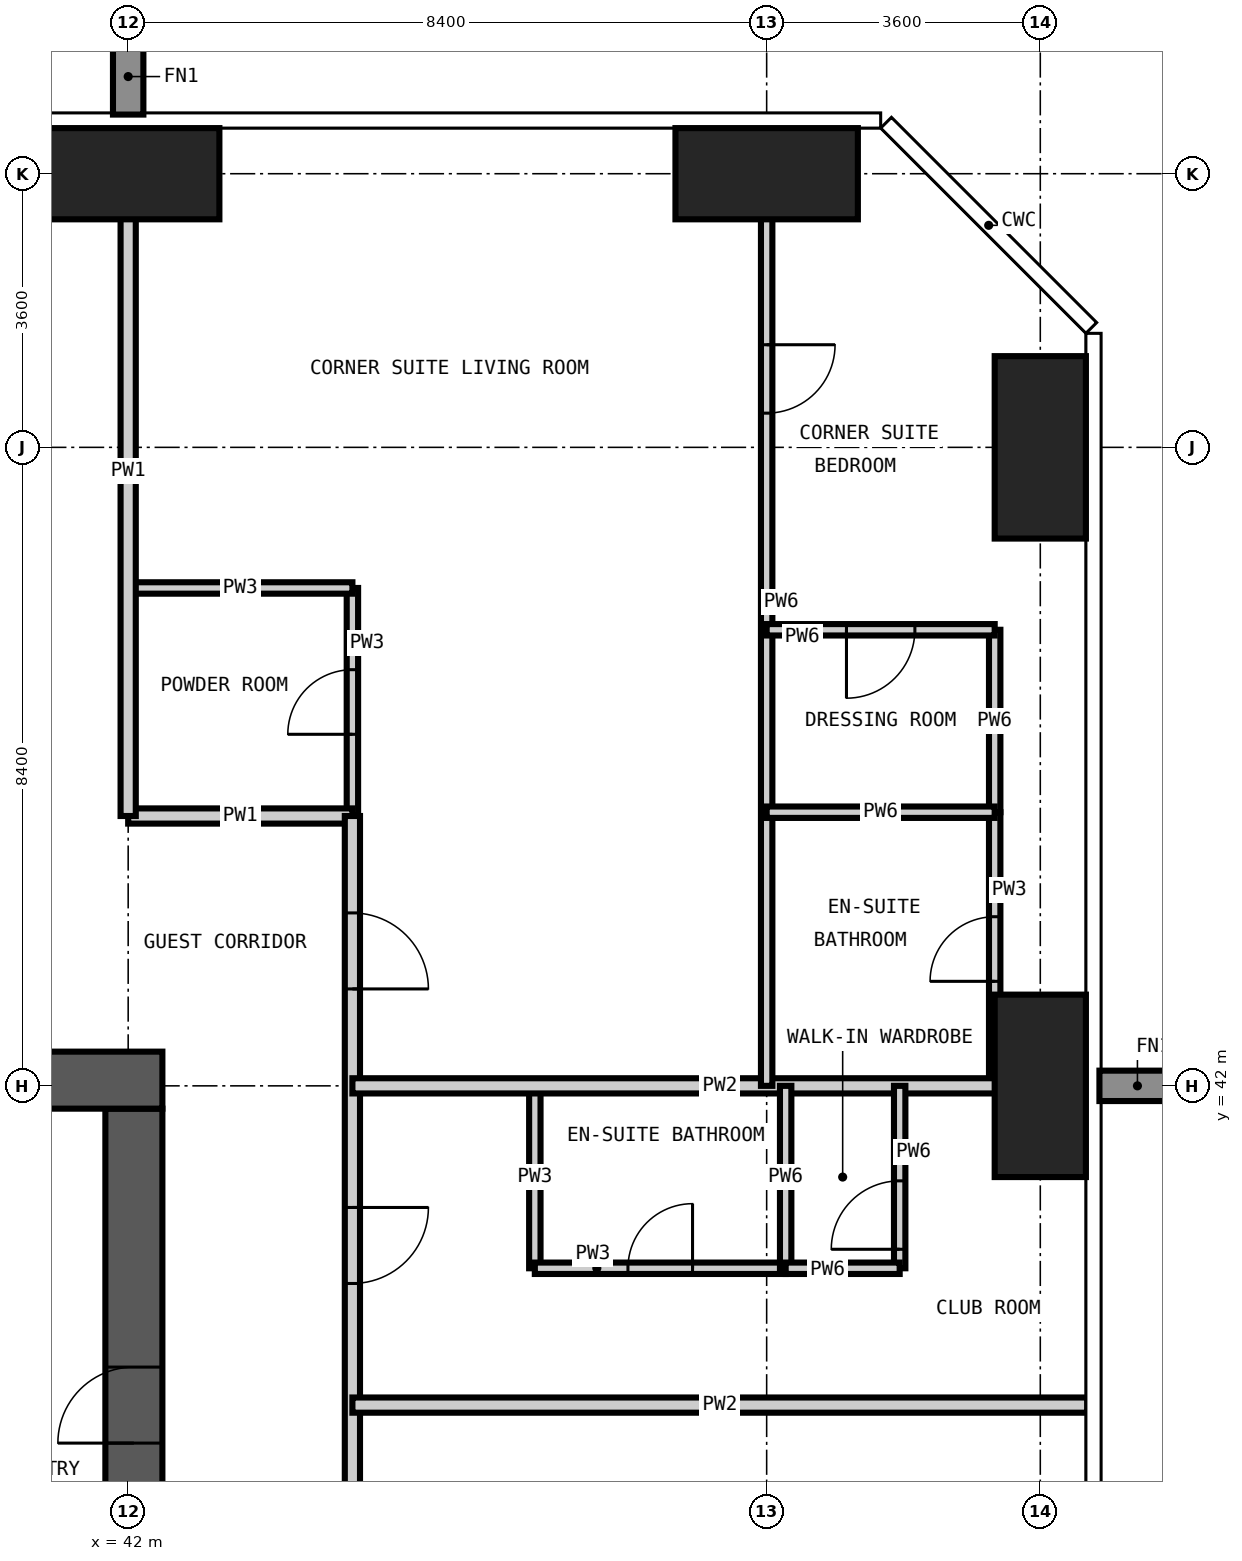
"""IFC4 building model, lengths in metres.
Left out: names, types, materials, properties, quantities, classifications, styles, units other than length and angle.
Written with IfcOpenShell. Run it as: python <this file> out.ifc"""

import sys

from ifc_helpers import new_model, si_unit, direction, frame, frame_2d, origin, origin_2d, place, context, subcontext, project, spatial, rectangle, extrude, element, fill, save


model = new_model("IFC4")
c1 = context("Model", 3, precision=1e-05, world=origin(), true_north=direction((0.0, 1.0)))
c2 = subcontext(c1, "Body", "Model", "MODEL_VIEW")
j1 = project(units=[si_unit("LENGTHUNIT", "METRE"), si_unit("PLANEANGLEUNIT", "RADIAN")], contexts=[c1])
p1 = place(None, origin())
s1 = spatial("IfcSite", under=j1, at=p1, CompositionType="ELEMENT")
p2 = place(p1, origin())
s2 = spatial("IfcBuilding", under=s1, at=p2, CompositionType="ELEMENT")
p3 = place(p2, frame((0.0, 0.0, 177.0)))
s3 = spatial("IfcBuildingStorey", under=s2, at=p3, CompositionType="ELEMENT", Elevation=177.0)
for number, where, z_axis, x_axis in (
    (1, (42.0, 54.0, -0.35), (0.0, 0.0, 1.0), (1.0, 0.0, 0.0)),
    (2, (50.4, 54.0, -0.35), (0.0, 0.0, 1.0), (1.0, 0.0, 0.0)),
):
    element("IfcColumn", number, at=place(p3, frame(where, z_axis=z_axis, x_axis=x_axis)), inside=s3, PredefinedType="COLUMN", context=c2, shape_type="SweptSolid", body=[
        extrude(rectangle(XDim=2.4, YDim=1.2, at=origin_2d()), origin(), (0.0, 0.0, 1.0), 3.6),
    ])
for number, where, z_axis, x_axis in (
    (3, (54.0, 42.0, -0.35), (0.0, 0.0, 1.0), (1.0, 0.0, 0.0)),
    (4, (54.0, 50.4, -0.35), (0.0, 0.0, 1.0), (1.0, 0.0, 0.0)),
):
    element("IfcColumn", number, at=place(p3, frame(where, z_axis=z_axis, x_axis=x_axis)), inside=s3, PredefinedType="COLUMN", context=c2, shape_type="SweptSolid", body=[
        extrude(rectangle(XDim=1.2, YDim=2.4, at=origin_2d()), origin(), (0.0, 0.0, 1.0), 3.6),
    ])
p4 = place(p3, frame((42.075, 17.1, -0.35), z_axis=(0.0, 0.0, 1.0), x_axis=(0.0, 1.0, 0.0)))
e5 = element("IfcWall", 5, at=p4, inside=s3, PredefinedType="SHEAR", context=c2, shape_type="SweptSolid", body=[
    extrude(rectangle(XDim=24.6, YDim=0.75, at=frame_2d((12.3, 0.0))), origin(), (0.0, 0.0, 1.0), 3.6),
])
p5 = place(p4, frame((0.5, 0.0, 0.35)))
e6 = element("IfcOpeningElement", 6, at=p5, cuts=e5, PredefinedType="OPENING", context=c2, shape_type="SweptSolid", body=[
    extrude(rectangle(XDim=1.2, YDim=2.2, at=frame_2d((0.6, 1.1))), frame((0.0, 0.385, 0.0), z_axis=(0.0, -1.0, 0.0), x_axis=(1.0, 0.0, 0.0)), (0.0, 0.0, 1.0), 0.77),
])
p6 = place(p4, frame((11.8, 0.0, 0.35)))
e7 = element("IfcOpeningElement", 7, at=p6, cuts=e5, PredefinedType="OPENING", context=c2, shape_type="SweptSolid", body=[
    extrude(rectangle(XDim=1.0, YDim=2.1, at=frame_2d((0.5, 1.05))), frame((0.0, 0.385, 0.0), z_axis=(0.0, -1.0, 0.0), x_axis=(1.0, 0.0, 0.0)), (0.0, 0.0, 1.0), 0.77),
])
p7 = place(p4, frame((20.2, 0.0, 0.35)))
e8 = element("IfcOpeningElement", 8, at=p7, cuts=e5, PredefinedType="OPENING", context=c2, shape_type="SweptSolid", body=[
    extrude(rectangle(XDim=1.0, YDim=2.1, at=frame_2d((0.5, 1.05))), frame((0.0, 0.385, 0.0), z_axis=(0.0, -1.0, 0.0), x_axis=(1.0, 0.0, 0.0)), (0.0, 0.0, 1.0), 0.77),
])
p8 = place(p3, frame((42.45, 42.075, -0.35), z_axis=(0.0, 0.0, 1.0), x_axis=(-1.0, 0.0, 0.0)))
e9 = element("IfcWall", 9, at=p8, inside=s3, PredefinedType="SHEAR", context=c2, shape_type="SweptSolid", body=[
    extrude(rectangle(XDim=26.1, YDim=0.75, at=frame_2d((13.05, 0.0))), origin(), (0.0, 0.0, 1.0), 3.6),
])
p9 = place(p8, frame((20.95, 0.0, 0.35)))
e10 = element("IfcOpeningElement", 10, at=p9, cuts=e9, PredefinedType="OPENING", context=c2, shape_type="SweptSolid", body=[
    extrude(rectangle(XDim=1.0, YDim=2.1, at=frame_2d((0.5, 1.05))), frame((0.0, 0.385, 0.0), z_axis=(0.0, -1.0, 0.0), x_axis=(1.0, 0.0, 0.0)), (0.0, 0.0, 1.0), 0.77),
])
p10 = place(p8, frame((10.35, 0.0, 0.35)))
e11 = element("IfcOpeningElement", 11, at=p10, cuts=e9, PredefinedType="OPENING", context=c2, shape_type="SweptSolid", body=[
    extrude(rectangle(XDim=1.2, YDim=2.2, at=frame_2d((0.6, 1.1))), frame((0.0, 0.385, 0.0), z_axis=(0.0, -1.0, 0.0), x_axis=(1.0, 0.0, 0.0)), (0.0, 0.0, 1.0), 0.77),
])
p11 = place(p3, frame((44.95, 45.55, 0.0), z_axis=(0.0, 0.0, 1.0), x_axis=(0.0, 1.0, 0.0)))
e12 = element("IfcWall", 12, at=p11, inside=s3, PredefinedType="PARTITIONING", context=c2, shape_type="SweptSolid", body=[
    extrude(rectangle(XDim=3.0, YDim=0.15, at=frame_2d((1.5, 0.0))), origin(), (0.0, 0.0, 1.0), 3.25),
])
p12 = place(p11, frame((1.075, 0.0, 0.0)))
e13 = element("IfcOpeningElement", 13, at=p12, cuts=e12, PredefinedType="OPENING", context=c2, shape_type="SweptSolid", body=[
    extrude(rectangle(XDim=0.85, YDim=2.1, at=frame_2d((0.425, 1.05))), frame((0.0, 0.085, 0.0), z_axis=(0.0, -1.0, 0.0), x_axis=(1.0, 0.0, 0.0)), (0.0, 0.0, 1.0), 0.17),
])
p13 = place(p3, frame((47.35, 39.6, 0.0), z_axis=(0.0, 0.0, 1.0), x_axis=(0.0, 1.0, 0.0)))
e14 = element("IfcWall", 14, at=p13, inside=s3, PredefinedType="PARTITIONING", context=c2, shape_type="SweptSolid", body=[
    extrude(rectangle(XDim=2.4, YDim=0.15, at=frame_2d((1.2, 0.0))), origin(), (0.0, 0.0, 1.0), 3.25),
])
p14 = place(p3, frame((53.4, 42.0, 0.0), z_axis=(0.0, 0.0, 1.0), x_axis=(0.0, 1.0, 0.0)))
e15 = element("IfcWall", 15, at=p14, inside=s3, PredefinedType="PARTITIONING", context=c2, shape_type="SweptSolid", body=[
    extrude(rectangle(XDim=3.6, YDim=0.15, at=frame_2d((1.8, 0.0))), origin(), (0.0, 0.0, 1.0), 3.25),
])
p15 = place(p14, frame((1.375, 0.0, 0.0)))
e16 = element("IfcOpeningElement", 16, at=p15, cuts=e15, PredefinedType="OPENING", context=c2, shape_type="SweptSolid", body=[
    extrude(rectangle(XDim=0.85, YDim=2.1, at=frame_2d((0.425, 1.05))), frame((0.0, 0.085, 0.0), z_axis=(0.0, -1.0, 0.0), x_axis=(1.0, 0.0, 0.0)), (0.0, 0.0, 1.0), 0.17),
])
p16 = place(p3, frame((47.35, 39.6, 0.0), z_axis=(0.0, 0.0, 1.0), x_axis=(1.0, 0.0, 0.0)))
e17 = element("IfcWall", 17, at=p16, inside=s3, PredefinedType="PARTITIONING", context=c2, shape_type="SweptSolid", body=[
    extrude(rectangle(XDim=3.3, YDim=0.15, at=frame_2d((1.65, 0.0))), origin(), (0.0, 0.0, 1.0), 3.25),
])
p17 = place(p16, frame((1.225, 0.0, 0.0)))
e18 = element("IfcOpeningElement", 18, at=p17, cuts=e17, PredefinedType="OPENING", context=c2, shape_type="SweptSolid", body=[
    extrude(rectangle(XDim=0.85, YDim=2.1, at=frame_2d((0.425, 1.05))), frame((0.0, 0.085, 0.0), z_axis=(0.0, -1.0, 0.0), x_axis=(1.0, 0.0, 0.0)), (0.0, 0.0, 1.0), 0.17),
])
p18 = place(p3, frame((42.0, 48.55, 0.0), z_axis=(0.0, 0.0, 1.0), x_axis=(1.0, 0.0, 0.0)))
e19 = element("IfcWall", 19, at=p18, inside=s3, PredefinedType="PARTITIONING", context=c2, shape_type="SweptSolid", body=[
    extrude(rectangle(XDim=2.95, YDim=0.15, at=frame_2d((1.475, 0.0))), origin(), (0.0, 0.0, 1.0), 3.25),
])
p19 = place(p3, frame((42.0, 45.55, 0.0), z_axis=(0.0, 0.0, 1.0), x_axis=(1.0, 0.0, 0.0)))
e20 = element("IfcWall", 20, at=p19, inside=s3, PredefinedType="PARTITIONING", context=c2, shape_type="SweptSolid", body=[
    extrude(rectangle(XDim=2.95, YDim=0.2, at=frame_2d((1.475, 0.0))), origin(), (0.0, 0.0, 1.0), 3.25),
])
p20 = place(p3, frame((42.0, 54.618, 0.0), z_axis=(0.0, 0.0, 1.0), x_axis=(0.0, -1.0, 0.0)))
e21 = element("IfcWall", 21, at=p20, inside=s3, PredefinedType="PARTITIONING", context=c2, shape_type="SweptSolid", body=[
    extrude(rectangle(XDim=9.068, YDim=0.2, at=frame_2d((4.534, 0.0))), origin(), (0.0, 0.0, 1.0), 3.25),
])
p21 = place(p3, frame((44.95, 45.55, 0.0), z_axis=(0.0, 0.0, 1.0), x_axis=(0.0, -1.0, 0.0)))
e22 = element("IfcWall", 22, at=p21, inside=s3, PredefinedType="PARTITIONING", context=c2, shape_type="SweptSolid", body=[
    extrude(rectangle(XDim=31.1, YDim=0.2, at=frame_2d((15.55, 0.0))), origin(), (0.0, 0.0, 1.0), 3.25),
])
p22 = place(p21, frame((26.15, 0.0, 0.0)))
e23 = element("IfcOpeningElement", 23, at=p22, cuts=e22, PredefinedType="OPENING", context=c2, shape_type="SweptSolid", body=[
    extrude(rectangle(XDim=1.0, YDim=2.2, at=frame_2d((0.5, 1.1))), frame((0.0, 0.11, 0.0), z_axis=(0.0, -1.0, 0.0), x_axis=(1.0, 0.0, 0.0)), (0.0, 0.0, 1.0), 0.22),
])
p23 = place(p21, frame((21.95, 0.0, 0.0)))
e24 = element("IfcOpeningElement", 24, at=p23, cuts=e22, PredefinedType="OPENING", context=c2, shape_type="SweptSolid", body=[
    extrude(rectangle(XDim=1.0, YDim=2.2, at=frame_2d((0.5, 1.1))), frame((0.0, 0.11, 0.0), z_axis=(0.0, -1.0, 0.0), x_axis=(1.0, 0.0, 0.0)), (0.0, 0.0, 1.0), 0.22),
])
p24 = place(p21, frame((17.75, 0.0, 0.0)))
e25 = element("IfcOpeningElement", 25, at=p24, cuts=e22, PredefinedType="OPENING", context=c2, shape_type="SweptSolid", body=[
    extrude(rectangle(XDim=1.0, YDim=2.2, at=frame_2d((0.5, 1.1))), frame((0.0, 0.11, 0.0), z_axis=(0.0, -1.0, 0.0), x_axis=(1.0, 0.0, 0.0)), (0.0, 0.0, 1.0), 0.22),
])
p25 = place(p21, frame((13.55, 0.0, 0.0)))
e26 = element("IfcOpeningElement", 26, at=p25, cuts=e22, PredefinedType="OPENING", context=c2, shape_type="SweptSolid", body=[
    extrude(rectangle(XDim=1.0, YDim=2.2, at=frame_2d((0.5, 1.1))), frame((0.0, 0.11, 0.0), z_axis=(0.0, -1.0, 0.0), x_axis=(1.0, 0.0, 0.0)), (0.0, 0.0, 1.0), 0.22),
])
p26 = place(p21, frame((9.35, 0.0, 0.0)))
e27 = element("IfcOpeningElement", 27, at=p26, cuts=e22, PredefinedType="OPENING", context=c2, shape_type="SweptSolid", body=[
    extrude(rectangle(XDim=1.0, YDim=2.2, at=frame_2d((0.5, 1.1))), frame((0.0, 0.11, 0.0), z_axis=(0.0, -1.0, 0.0), x_axis=(1.0, 0.0, 0.0)), (0.0, 0.0, 1.0), 0.22),
])
p27 = place(p21, frame((5.15, 0.0, 0.0)))
e28 = element("IfcOpeningElement", 28, at=p27, cuts=e22, PredefinedType="OPENING", context=c2, shape_type="SweptSolid", body=[
    extrude(rectangle(XDim=1.0, YDim=2.2, at=frame_2d((0.5, 1.1))), frame((0.0, 0.11, 0.0), z_axis=(0.0, -1.0, 0.0), x_axis=(1.0, 0.0, 0.0)), (0.0, 0.0, 1.0), 0.22),
])
p28 = place(p21, frame((29.425, 0.0, 0.0)))
e29 = element("IfcOpeningElement", 29, at=p28, cuts=e22, PredefinedType="OPENING", context=c2, shape_type="SweptSolid", body=[
    extrude(rectangle(XDim=1.0, YDim=2.2, at=frame_2d((0.5, 1.1))), frame((0.0, 0.11, 0.0), z_axis=(0.0, -1.0, 0.0), x_axis=(1.0, 0.0, 0.0)), (0.0, 0.0, 1.0), 0.22),
])
p29 = place(p21, frame((1.275, 0.0, 0.0)))
e30 = element("IfcOpeningElement", 30, at=p29, cuts=e22, PredefinedType="OPENING", context=c2, shape_type="SweptSolid", body=[
    extrude(rectangle(XDim=1.0, YDim=2.2, at=frame_2d((0.5, 1.1))), frame((0.0, 0.11, 0.0), z_axis=(0.0, -1.0, 0.0), x_axis=(1.0, 0.0, 0.0)), (0.0, 0.0, 1.0), 0.22),
])
for number, where, z_axis, x_axis in (
    (31, (44.95, 37.8, 0.0), (0.0, 0.0, 1.0), (1.0, 0.0, 0.0)),
    (32, (44.95, 42.0, 0.0), (0.0, 0.0, 1.0), (1.0, 0.0, 0.0)),
):
    element("IfcWall", number, at=place(p3, frame(where, z_axis=z_axis, x_axis=x_axis)), inside=s3, PredefinedType="PARTITIONING", context=c2, shape_type="SweptSolid", body=[
        extrude(rectangle(XDim=9.668, YDim=0.2, at=frame_2d((4.834, 0.0))), origin(), (0.0, 0.0, 1.0), 3.25),
    ])
p30 = place(p3, frame((50.4, 42.0, 0.0), z_axis=(0.0, 0.0, 1.0), x_axis=(0.0, 1.0, 0.0)))
e33 = element("IfcWall", 33, at=p30, inside=s3, PredefinedType="PARTITIONING", context=c2, shape_type="SweptSolid", body=[
    extrude(rectangle(XDim=12.618, YDim=0.15, at=frame_2d((6.309, 0.0))), origin(), (0.0, 0.0, 1.0), 3.25),
])
p31 = place(p30, frame((8.85, 0.0, 0.0)))
e34 = element("IfcOpeningElement", 34, at=p31, cuts=e33, PredefinedType="OPENING", context=c2, shape_type="SweptSolid", body=[
    extrude(rectangle(XDim=0.9, YDim=2.1, at=frame_2d((0.45, 1.05))), frame((0.0, 0.085, 0.0), z_axis=(0.0, -1.0, 0.0), x_axis=(1.0, 0.0, 0.0)), (0.0, 0.0, 1.0), 0.17),
])
p32 = place(p3, frame((50.65, 39.6, 0.0), z_axis=(0.0, 0.0, 1.0), x_axis=(0.0, 1.0, 0.0)))
e35 = element("IfcWall", 35, at=p32, inside=s3, PredefinedType="PARTITIONING", context=c2, shape_type="SweptSolid", body=[
    extrude(rectangle(XDim=2.4, YDim=0.15, at=frame_2d((1.2, 0.0))), origin(), (0.0, 0.0, 1.0), 3.25),
])
p33 = place(p3, frame((52.15, 39.6, 0.0), z_axis=(0.0, 0.0, 1.0), x_axis=(0.0, 1.0, 0.0)))
e36 = element("IfcWall", 36, at=p33, inside=s3, PredefinedType="PARTITIONING", context=c2, shape_type="SweptSolid", body=[
    extrude(rectangle(XDim=2.4, YDim=0.15, at=frame_2d((1.2, 0.0))), origin(), (0.0, 0.0, 1.0), 3.25),
])
p34 = place(p33, frame((0.25, 0.0, 0.0)))
e37 = element("IfcOpeningElement", 37, at=p34, cuts=e36, PredefinedType="OPENING", context=c2, shape_type="SweptSolid", body=[
    extrude(rectangle(XDim=0.9, YDim=2.1, at=frame_2d((0.45, 1.05))), frame((0.0, 0.085, 0.0), z_axis=(0.0, -1.0, 0.0), x_axis=(1.0, 0.0, 0.0)), (0.0, 0.0, 1.0), 0.17),
])
p35 = place(p3, frame((53.4, 45.6, 0.0), z_axis=(0.0, 0.0, 1.0), x_axis=(0.0, 1.0, 0.0)))
e38 = element("IfcWall", 38, at=p35, inside=s3, PredefinedType="PARTITIONING", context=c2, shape_type="SweptSolid", body=[
    extrude(rectangle(XDim=2.4, YDim=0.15, at=frame_2d((1.2, 0.0))), origin(), (0.0, 0.0, 1.0), 3.25),
])
p36 = place(p3, frame((50.65, 39.6, 0.0), z_axis=(0.0, 0.0, 1.0), x_axis=(1.0, 0.0, 0.0)))
e39 = element("IfcWall", 39, at=p36, inside=s3, PredefinedType="PARTITIONING", context=c2, shape_type="SweptSolid", body=[
    extrude(rectangle(XDim=1.5, YDim=0.15, at=frame_2d((0.75, 0.0))), origin(), (0.0, 0.0, 1.0), 3.25),
])
p37 = place(p3, frame((50.4, 45.6, 0.0), z_axis=(0.0, 0.0, 1.0), x_axis=(1.0, 0.0, 0.0)))
e40 = element("IfcWall", 40, at=p37, inside=s3, PredefinedType="PARTITIONING", context=c2, shape_type="SweptSolid", body=[
    extrude(rectangle(XDim=3.0, YDim=0.15, at=frame_2d((1.5, 0.0))), origin(), (0.0, 0.0, 1.0), 3.25),
])
p38 = place(p3, frame((50.4, 48.0, 0.0), z_axis=(0.0, 0.0, 1.0), x_axis=(1.0, 0.0, 0.0)))
e41 = element("IfcWall", 41, at=p38, inside=s3, PredefinedType="PARTITIONING", context=c2, shape_type="SweptSolid", body=[
    extrude(rectangle(XDim=3.0, YDim=0.15, at=frame_2d((1.5, 0.0))), origin(), (0.0, 0.0, 1.0), 3.25),
])
p39 = place(p38, frame((1.05, 0.0, 0.0)))
e42 = element("IfcOpeningElement", 42, at=p39, cuts=e41, PredefinedType="OPENING", context=c2, shape_type="SweptSolid", body=[
    extrude(rectangle(XDim=0.9, YDim=2.1, at=frame_2d((0.45, 1.05))), frame((0.0, 0.085, 0.0), z_axis=(0.0, -1.0, 0.0), x_axis=(1.0, 0.0, 0.0)), (0.0, 0.0, 1.0), 0.17),
])
p40 = place(p27, origin())
e43 = element("IfcDoor", 43, at=p40, inside=s3, OperationType="SINGLE_SWING_LEFT", PredefinedType="DOOR", context=c2, shape_type="SweptSolid", body=[
    extrude(rectangle(XDim=1.0, YDim=2.2, at=frame_2d((0.5, 1.1))), frame((0.0, 0.025, 0.0), z_axis=(0.0, -1.0, 0.0), x_axis=(1.0, 0.0, 0.0)), (0.0, 0.0, 1.0), 0.05),
])
fill(e28, e43)
p41 = place(p17, origin())
e44 = element("IfcDoor", 44, at=p41, inside=s3, OperationType="SINGLE_SWING_RIGHT", PredefinedType="DOOR", context=c2, shape_type="SweptSolid", body=[
    extrude(rectangle(XDim=0.85, YDim=2.1, at=frame_2d((0.425, 1.05))), frame((0.0, 0.025, 0.0), z_axis=(0.0, -1.0, 0.0), x_axis=(1.0, 0.0, 0.0)), (0.0, 0.0, 1.0), 0.05),
])
fill(e18, e44)
p42 = place(p34, origin())
e45 = element("IfcDoor", 45, at=p42, inside=s3, OperationType="SINGLE_SWING_LEFT", PredefinedType="DOOR", context=c2, shape_type="SweptSolid", body=[
    extrude(rectangle(XDim=0.9, YDim=2.1, at=frame_2d((0.45, 1.05))), frame((0.0, 0.025, 0.0), z_axis=(0.0, -1.0, 0.0), x_axis=(1.0, 0.0, 0.0)), (0.0, 0.0, 1.0), 0.05),
])
fill(e37, e45)
p43 = place(p29, origin())
e46 = element("IfcDoor", 46, at=p43, inside=s3, OperationType="SINGLE_SWING_RIGHT", PredefinedType="DOOR", context=c2, shape_type="SweptSolid", body=[
    extrude(rectangle(XDim=1.0, YDim=2.2, at=frame_2d((0.5, 1.1))), frame((0.0, 0.025, 0.0), z_axis=(0.0, -1.0, 0.0), x_axis=(1.0, 0.0, 0.0)), (0.0, 0.0, 1.0), 0.05),
])
fill(e30, e46)
p44 = place(p12, origin())
e47 = element("IfcDoor", 47, at=p44, inside=s3, OperationType="SINGLE_SWING_LEFT", PredefinedType="DOOR", context=c2, shape_type="SweptSolid", body=[
    extrude(rectangle(XDim=0.85, YDim=2.1, at=frame_2d((0.425, 1.05))), frame((0.0, 0.025, 0.0), z_axis=(0.0, -1.0, 0.0), x_axis=(1.0, 0.0, 0.0)), (0.0, 0.0, 1.0), 0.05),
])
fill(e13, e47)
p45 = place(p31, frame((0.9, 0.0, 0.0), z_axis=(0.0, 0.0, 1.0), x_axis=(-1.0, 0.0, 0.0)))
e48 = element("IfcDoor", 48, at=p45, inside=s3, OperationType="SINGLE_SWING_LEFT", PredefinedType="DOOR", context=c2, shape_type="SweptSolid", body=[
    extrude(rectangle(XDim=0.9, YDim=2.1, at=frame_2d((0.45, 1.05))), frame((0.0, 0.025, 0.0), z_axis=(0.0, -1.0, 0.0), x_axis=(1.0, 0.0, 0.0)), (0.0, 0.0, 1.0), 0.05),
])
fill(e34, e48)
p46 = place(p15, origin())
e49 = element("IfcDoor", 49, at=p46, inside=s3, OperationType="SINGLE_SWING_LEFT", PredefinedType="DOOR", context=c2, shape_type="SweptSolid", body=[
    extrude(rectangle(XDim=0.85, YDim=2.1, at=frame_2d((0.425, 1.05))), frame((0.0, 0.025, 0.0), z_axis=(0.0, -1.0, 0.0), x_axis=(1.0, 0.0, 0.0)), (0.0, 0.0, 1.0), 0.05),
])
fill(e16, e49)
p47 = place(p39, frame((0.9, 0.0, 0.0), z_axis=(0.0, 0.0, 1.0), x_axis=(-1.0, 0.0, 0.0)))
e50 = element("IfcDoor", 50, at=p47, inside=s3, OperationType="SINGLE_SWING_RIGHT", PredefinedType="DOOR", context=c2, shape_type="SweptSolid", body=[
    extrude(rectangle(XDim=0.9, YDim=2.1, at=frame_2d((0.45, 1.05))), frame((0.0, 0.025, 0.0), z_axis=(0.0, -1.0, 0.0), x_axis=(1.0, 0.0, 0.0)), (0.0, 0.0, 1.0), 0.05),
])
fill(e42, e50)
p48 = place(p7, origin())
e51 = element("IfcDoor", 51, at=p48, inside=s3, OperationType="SINGLE_SWING_LEFT", PredefinedType="DOOR", context=c2, shape_type="SweptSolid", body=[
    extrude(rectangle(XDim=1.0, YDim=2.1, at=frame_2d((0.5, 1.05))), frame((0.0, 0.025, 0.0), z_axis=(0.0, -1.0, 0.0), x_axis=(1.0, 0.0, 0.0)), (0.0, 0.0, 1.0), 0.05),
])
fill(e8, e51)
save(model, sys.argv[1])
